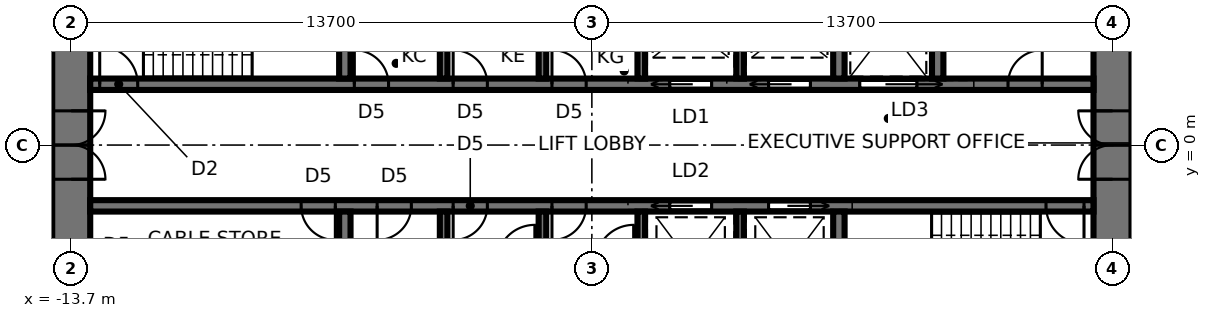
"""IFC4 building model, lengths in metres.
Left out: names, types, materials, properties, quantities, classifications, styles, units other than length and angle.
Written with IfcOpenShell. Run it as: python <this file> out.ifc"""

import sys

from ifc_helpers import new_model, si_unit, direction, frame, frame_2d, origin, place, context, subcontext, project, spatial, rectangle, extrude, element, fill, save


model = new_model("IFC4")
c1 = context("Model", 3, precision=1e-05, world=origin(), true_north=direction((0.0, 1.0)))
c2 = subcontext(c1, "Body", "Model", "MODEL_VIEW")
j1 = project(units=[si_unit("LENGTHUNIT", "METRE"), si_unit("PLANEANGLEUNIT", "RADIAN")], contexts=[c1])
p1 = place(None, origin())
s1 = spatial("IfcSite", under=j1, at=p1, CompositionType="ELEMENT")
p2 = place(p1, origin())
s2 = spatial("IfcBuilding", under=s1, at=p2, CompositionType="ELEMENT")
p3 = place(p2, frame((0.0, 0.0, 251.8)))
s3 = spatial("IfcBuildingStorey", under=s2, at=p3, CompositionType="ELEMENT", Elevation=251.8)
p4 = place(p3, frame((13.7, -9.5, 0.0), z_axis=(0.0, 0.0, 1.0), x_axis=(0.0, 1.0, 0.0)))
e1 = element("IfcWall", 1, at=p4, inside=s3, PredefinedType="SHEAR", context=c2, shape_type="SweptSolid", body=[
    extrude(rectangle(XDim=19.0, YDim=1.0, at=frame_2d((9.5, 0.0))), origin(), (0.0, 0.0, 1.0), 4.2),
])
p5 = place(p4, frame((8.6, 0.0, 0.0)))
e2 = element("IfcOpeningElement", 2, at=p5, cuts=e1, PredefinedType="OPENING", context=c2, shape_type="SweptSolid", body=[
    extrude(rectangle(XDim=1.8, YDim=2.4, at=frame_2d((0.9, 1.2))), frame((0.0, 0.51, 0.0), z_axis=(0.0, -1.0, 0.0), x_axis=(1.0, 0.0, 0.0)), (0.0, 0.0, 1.0), 1.02),
])
p6 = place(p3, frame((-13.7, 9.5, 0.0), z_axis=(0.0, 0.0, 1.0), x_axis=(0.0, -1.0, 0.0)))
e3 = element("IfcWall", 3, at=p6, inside=s3, PredefinedType="SHEAR", context=c2, shape_type="SweptSolid", body=[
    extrude(rectangle(XDim=19.0, YDim=1.0, at=frame_2d((9.5, 0.0))), origin(), (0.0, 0.0, 1.0), 4.2),
])
p7 = place(p6, frame((8.6, 0.0, 0.0)))
e4 = element("IfcOpeningElement", 4, at=p7, cuts=e3, PredefinedType="OPENING", context=c2, shape_type="SweptSolid", body=[
    extrude(rectangle(XDim=1.8, YDim=2.4, at=frame_2d((0.9, 1.2))), frame((0.0, 0.51, 0.0), z_axis=(0.0, -1.0, 0.0), x_axis=(1.0, 0.0, 0.0)), (0.0, 0.0, 1.0), 1.02),
])
p8 = place(p3, frame((-13.2, 1.6, 0.0), z_axis=(0.0, 0.0, 1.0), x_axis=(1.0, 0.0, 0.0)))
e5 = element("IfcWall", 5, at=p8, inside=s3, PredefinedType="SHEAR", context=c2, shape_type="SweptSolid", body=[
    extrude(rectangle(XDim=26.4, YDim=0.3, at=frame_2d((13.2, 0.0))), origin(), (0.0, 0.0, 1.0), 4.2),
])
p9 = place(p8, frame((0.25, 0.0, 0.0)))
e6 = element("IfcOpeningElement", 6, at=p9, cuts=e5, PredefinedType="OPENING", context=c2, shape_type="SweptSolid", body=[
    extrude(rectangle(XDim=1.0, YDim=2.1, at=frame_2d((0.5, 1.05))), frame((0.0, 0.16, 0.0), z_axis=(0.0, -1.0, 0.0), x_axis=(1.0, 0.0, 0.0)), (0.0, 0.0, 1.0), 0.32),
])
p10 = place(p8, frame((20.25, 0.0, 0.0)))
e7 = element("IfcOpeningElement", 7, at=p10, cuts=e5, PredefinedType="OPENING", context=c2, shape_type="SweptSolid", body=[
    extrude(rectangle(XDim=1.5, YDim=2.4, at=frame_2d((0.75, 1.2))), frame((0.0, 0.16, 0.0), z_axis=(0.0, -1.0, 0.0), x_axis=(1.0, 0.0, 0.0)), (0.0, 0.0, 1.0), 0.32),
])
p11 = place(p8, frame((6.95, 0.0, 0.0)))
e8 = element("IfcOpeningElement", 8, at=p11, cuts=e5, PredefinedType="OPENING", context=c2, shape_type="SweptSolid", body=[
    extrude(rectangle(XDim=0.9, YDim=2.1, at=frame_2d((0.45, 1.05))), frame((0.0, 0.16, 0.0), z_axis=(0.0, -1.0, 0.0), x_axis=(1.0, 0.0, 0.0)), (0.0, 0.0, 1.0), 0.32),
])
p12 = place(p8, frame((9.55, 0.0, 0.0)))
e9 = element("IfcOpeningElement", 9, at=p12, cuts=e5, PredefinedType="OPENING", context=c2, shape_type="SweptSolid", body=[
    extrude(rectangle(XDim=0.9, YDim=2.1, at=frame_2d((0.45, 1.05))), frame((0.0, 0.16, 0.0), z_axis=(0.0, -1.0, 0.0), x_axis=(1.0, 0.0, 0.0)), (0.0, 0.0, 1.0), 0.32),
])
p13 = place(p8, frame((12.15, 0.0, 0.0)))
e10 = element("IfcOpeningElement", 10, at=p13, cuts=e5, PredefinedType="OPENING", context=c2, shape_type="SweptSolid", body=[
    extrude(rectangle(XDim=0.9, YDim=2.1, at=frame_2d((0.45, 1.05))), frame((0.0, 0.16, 0.0), z_axis=(0.0, -1.0, 0.0), x_axis=(1.0, 0.0, 0.0)), (0.0, 0.0, 1.0), 0.32),
])
p14 = place(p8, frame((15.25, 0.0, 0.0)))
e11 = element("IfcOpeningElement", 11, at=p14, cuts=e5, PredefinedType="OPENING", context=c2, shape_type="SweptSolid", body=[
    extrude(rectangle(XDim=1.1, YDim=2.3, at=frame_2d((0.55, 1.15))), frame((0.0, 0.16, 0.0), z_axis=(0.0, -1.0, 0.0), x_axis=(1.0, 0.0, 0.0)), (0.0, 0.0, 1.0), 0.32),
])
p15 = place(p8, frame((17.85, 0.0, 0.0)))
e12 = element("IfcOpeningElement", 12, at=p15, cuts=e5, PredefinedType="OPENING", context=c2, shape_type="SweptSolid", body=[
    extrude(rectangle(XDim=1.1, YDim=2.3, at=frame_2d((0.55, 1.15))), frame((0.0, 0.16, 0.0), z_axis=(0.0, -1.0, 0.0), x_axis=(1.0, 0.0, 0.0)), (0.0, 0.0, 1.0), 0.32),
])
p16 = place(p8, frame((24.15, 0.0, 0.0)))
e13 = element("IfcOpeningElement", 13, at=p16, cuts=e5, PredefinedType="OPENING", context=c2, shape_type="SweptSolid", body=[
    extrude(rectangle(XDim=0.9, YDim=2.1, at=frame_2d((0.45, 1.05))), frame((0.0, 0.16, 0.0), z_axis=(0.0, -1.0, 0.0), x_axis=(1.0, 0.0, 0.0)), (0.0, 0.0, 1.0), 0.32),
])
p17 = place(p3, frame((-13.2, -1.6, 0.0), z_axis=(0.0, 0.0, 1.0), x_axis=(1.0, 0.0, 0.0)))
e14 = element("IfcWall", 14, at=p17, inside=s3, PredefinedType="SHEAR", context=c2, shape_type="SweptSolid", body=[
    extrude(rectangle(XDim=26.4, YDim=0.3, at=frame_2d((13.2, 0.0))), origin(), (0.0, 0.0, 1.0), 4.2),
])
p18 = place(p17, frame((25.15, 0.0, 0.0)))
e15 = element("IfcOpeningElement", 15, at=p18, cuts=e14, PredefinedType="OPENING", context=c2, shape_type="SweptSolid", body=[
    extrude(rectangle(XDim=1.0, YDim=2.1, at=frame_2d((0.5, 1.05))), frame((0.0, 0.16, 0.0), z_axis=(0.0, -1.0, 0.0), x_axis=(1.0, 0.0, 0.0)), (0.0, 0.0, 1.0), 0.32),
])
p19 = place(p17, frame((7.55, 0.0, 0.0)))
e16 = element("IfcOpeningElement", 16, at=p19, cuts=e14, PredefinedType="OPENING", context=c2, shape_type="SweptSolid", body=[
    extrude(rectangle(XDim=0.9, YDim=2.1, at=frame_2d((0.45, 1.05))), frame((0.0, 0.16, 0.0), z_axis=(0.0, -1.0, 0.0), x_axis=(1.0, 0.0, 0.0)), (0.0, 0.0, 1.0), 0.32),
])
p20 = place(p17, frame((9.55, 0.0, 0.0)))
e17 = element("IfcOpeningElement", 17, at=p20, cuts=e14, PredefinedType="OPENING", context=c2, shape_type="SweptSolid", body=[
    extrude(rectangle(XDim=0.9, YDim=2.1, at=frame_2d((0.45, 1.05))), frame((0.0, 0.16, 0.0), z_axis=(0.0, -1.0, 0.0), x_axis=(1.0, 0.0, 0.0)), (0.0, 0.0, 1.0), 0.32),
])
p21 = place(p17, frame((12.15, 0.0, 0.0)))
e18 = element("IfcOpeningElement", 18, at=p21, cuts=e14, PredefinedType="OPENING", context=c2, shape_type="SweptSolid", body=[
    extrude(rectangle(XDim=0.9, YDim=2.1, at=frame_2d((0.45, 1.05))), frame((0.0, 0.16, 0.0), z_axis=(0.0, -1.0, 0.0), x_axis=(1.0, 0.0, 0.0)), (0.0, 0.0, 1.0), 0.32),
])
p22 = place(p17, frame((15.25, 0.0, 0.0)))
e19 = element("IfcOpeningElement", 19, at=p22, cuts=e14, PredefinedType="OPENING", context=c2, shape_type="SweptSolid", body=[
    extrude(rectangle(XDim=1.1, YDim=2.3, at=frame_2d((0.55, 1.15))), frame((0.0, 0.16, 0.0), z_axis=(0.0, -1.0, 0.0), x_axis=(1.0, 0.0, 0.0)), (0.0, 0.0, 1.0), 0.32),
])
p23 = place(p17, frame((17.85, 0.0, 0.0)))
e20 = element("IfcOpeningElement", 20, at=p23, cuts=e14, PredefinedType="OPENING", context=c2, shape_type="SweptSolid", body=[
    extrude(rectangle(XDim=1.1, YDim=2.3, at=frame_2d((0.55, 1.15))), frame((0.0, 0.16, 0.0), z_axis=(0.0, -1.0, 0.0), x_axis=(1.0, 0.0, 0.0)), (0.0, 0.0, 1.0), 0.32),
])
p24 = place(p17, frame((5.55, 0.0, 0.0)))
e21 = element("IfcOpeningElement", 21, at=p24, cuts=e14, PredefinedType="OPENING", context=c2, shape_type="SweptSolid", body=[
    extrude(rectangle(XDim=0.9, YDim=2.1, at=frame_2d((0.45, 1.05))), frame((0.0, 0.16, 0.0), z_axis=(0.0, -1.0, 0.0), x_axis=(1.0, 0.0, 0.0)), (0.0, 0.0, 1.0), 0.32),
])
for number, where, z_axis, x_axis in (
    (22, (-6.5, 1.75, 0.0), (0.0, 0.0, 1.0), (0.0, 1.0, 0.0)),
    (23, (6.5, 1.75, 0.0), (0.0, 0.0, 1.0), (0.0, 1.0, 0.0)),
):
    element("IfcWall", number, at=place(p3, frame(where, z_axis=z_axis, x_axis=x_axis)), inside=s3, PredefinedType="SHEAR", context=c2, shape_type="SweptSolid", body=[
        extrude(rectangle(XDim=2.7, YDim=0.3, at=frame_2d((1.35, 0.0))), origin(), (0.0, 0.0, 1.0), 4.2),
    ])
for number, where, z_axis, x_axis in (
    (24, (-3.9, 1.75, 0.0), (0.0, 0.0, 1.0), (0.0, 1.0, 0.0)),
    (25, (-1.3, 1.75, 0.0), (0.0, 0.0, 1.0), (0.0, 1.0, 0.0)),
    (26, (1.3, 1.75, 0.0), (0.0, 0.0, 1.0), (0.0, 1.0, 0.0)),
    (27, (3.9, 1.75, 0.0), (0.0, 0.0, 1.0), (0.0, 1.0, 0.0)),
):
    element("IfcWall", number, at=place(p3, frame(where, z_axis=z_axis, x_axis=x_axis)), inside=s3, PredefinedType="SHEAR", context=c2, shape_type="SweptSolid", body=[
        extrude(rectangle(XDim=2.7, YDim=0.2, at=frame_2d((1.35, 0.0))), origin(), (0.0, 0.0, 1.0), 4.2),
    ])
for number, where, z_axis, x_axis in (
    (28, (-6.5, -1.75, 0.0), (0.0, 0.0, 1.0), (0.0, -1.0, 0.0)),
    (29, (6.5, -1.75, 0.0), (0.0, 0.0, 1.0), (0.0, -1.0, 0.0)),
):
    element("IfcWall", number, at=place(p3, frame(where, z_axis=z_axis, x_axis=x_axis)), inside=s3, PredefinedType="SHEAR", context=c2, shape_type="SweptSolid", body=[
        extrude(rectangle(XDim=2.7, YDim=0.3, at=frame_2d((1.35, 0.0))), origin(), (0.0, 0.0, 1.0), 4.2),
    ])
for number, where, z_axis, x_axis in (
    (30, (-3.9, -1.75, 0.0), (0.0, 0.0, 1.0), (0.0, -1.0, 0.0)),
    (31, (-1.3, -1.75, 0.0), (0.0, 0.0, 1.0), (0.0, -1.0, 0.0)),
    (32, (1.3, -1.75, 0.0), (0.0, 0.0, 1.0), (0.0, -1.0, 0.0)),
    (33, (3.9, -1.75, 0.0), (0.0, 0.0, 1.0), (0.0, -1.0, 0.0)),
):
    element("IfcWall", number, at=place(p3, frame(where, z_axis=z_axis, x_axis=x_axis)), inside=s3, PredefinedType="SHEAR", context=c2, shape_type="SweptSolid", body=[
        extrude(rectangle(XDim=2.7, YDim=0.2, at=frame_2d((1.35, 0.0))), origin(), (0.0, 0.0, 1.0), 4.2),
    ])
p25 = place(p3, frame((9.1, 1.75, 0.0), z_axis=(0.0, 0.0, 1.0), x_axis=(0.0, 1.0, 0.0)))
e34 = element("IfcWall", 34, at=p25, inside=s3, PredefinedType="SHEAR", context=c2, shape_type="SweptSolid", body=[
    extrude(rectangle(XDim=2.7, YDim=0.3, at=frame_2d((1.35, 0.0))), origin(), (0.0, 0.0, 1.0), 4.2),
])
p26 = place(p7, origin())
e35 = element("IfcDoor", 35, at=p26, inside=s3, OperationType="DOUBLE_DOOR_SINGLE_SWING", PredefinedType="DOOR", context=c2, shape_type="SweptSolid", body=[
    extrude(rectangle(XDim=1.72, YDim=2.36, at=frame_2d((0.9, 1.18))), frame((0.0, 0.025, 0.0), z_axis=(0.0, -1.0, 0.0), x_axis=(1.0, 0.0, 0.0)), (0.0, 0.0, 1.0), 0.05),
    extrude(rectangle(XDim=0.04, YDim=2.4, at=frame_2d((0.02, 1.2))), frame((0.0, 0.25, 0.0), z_axis=(0.0, -1.0, 0.0), x_axis=(1.0, 0.0, 0.0)), (0.0, 0.0, 1.0), 0.5),
    extrude(rectangle(XDim=0.04, YDim=2.4, at=frame_2d((1.78, 1.2))), frame((0.0, 0.25, 0.0), z_axis=(0.0, -1.0, 0.0), x_axis=(1.0, 0.0, 0.0)), (0.0, 0.0, 1.0), 0.5),
    extrude(rectangle(XDim=1.72, YDim=0.04, at=frame_2d((0.9, 2.38))), frame((0.0, 0.25, 0.0), z_axis=(0.0, -1.0, 0.0), x_axis=(1.0, 0.0, 0.0)), (0.0, 0.0, 1.0), 0.5),
])
fill(e4, e35)
p27 = place(p5, origin())
e36 = element("IfcDoor", 36, at=p27, inside=s3, OperationType="DOUBLE_DOOR_SINGLE_SWING", PredefinedType="DOOR", context=c2, shape_type="SweptSolid", body=[
    extrude(rectangle(XDim=1.72, YDim=2.36, at=frame_2d((0.9, 1.18))), frame((0.0, 0.025, 0.0), z_axis=(0.0, -1.0, 0.0), x_axis=(1.0, 0.0, 0.0)), (0.0, 0.0, 1.0), 0.05),
    extrude(rectangle(XDim=0.04, YDim=2.4, at=frame_2d((0.02, 1.2))), frame((0.0, 0.25, 0.0), z_axis=(0.0, -1.0, 0.0), x_axis=(1.0, 0.0, 0.0)), (0.0, 0.0, 1.0), 0.5),
    extrude(rectangle(XDim=0.04, YDim=2.4, at=frame_2d((1.78, 1.2))), frame((0.0, 0.25, 0.0), z_axis=(0.0, -1.0, 0.0), x_axis=(1.0, 0.0, 0.0)), (0.0, 0.0, 1.0), 0.5),
    extrude(rectangle(XDim=1.72, YDim=0.04, at=frame_2d((0.9, 2.38))), frame((0.0, 0.25, 0.0), z_axis=(0.0, -1.0, 0.0), x_axis=(1.0, 0.0, 0.0)), (0.0, 0.0, 1.0), 0.5),
])
fill(e2, e36)
p28 = place(p9, origin())
e37 = element("IfcDoor", 37, at=p28, inside=s3, OperationType="SINGLE_SWING_LEFT", PredefinedType="DOOR", context=c2, shape_type="SweptSolid", body=[
    extrude(rectangle(XDim=1.0, YDim=2.1, at=frame_2d((0.5, 1.05))), frame((0.0, 0.025, 0.0), z_axis=(0.0, -1.0, 0.0), x_axis=(1.0, 0.0, 0.0)), (0.0, 0.0, 1.0), 0.05),
])
fill(e6, e37)
p29 = place(p18, frame((1.0, 0.0, 0.0), z_axis=(0.0, 0.0, 1.0), x_axis=(-1.0, 0.0, 0.0)))
e38 = element("IfcDoor", 38, at=p29, inside=s3, OperationType="SINGLE_SWING_LEFT", PredefinedType="DOOR", context=c2, shape_type="SweptSolid", body=[
    extrude(rectangle(XDim=1.0, YDim=2.1, at=frame_2d((0.5, 1.05))), frame((0.0, 0.025, 0.0), z_axis=(0.0, -1.0, 0.0), x_axis=(1.0, 0.0, 0.0)), (0.0, 0.0, 1.0), 0.05),
])
fill(e15, e38)
p30 = place(p10, origin())
e39 = element("IfcDoor", 39, at=p30, inside=s3, OperationType="SLIDING_TO_RIGHT", PredefinedType="DOOR", context=c2, shape_type="SweptSolid", body=[
    extrude(rectangle(XDim=1.5, YDim=2.4, at=frame_2d((0.75, 1.2))), frame((0.0, 0.025, 0.0), z_axis=(0.0, -1.0, 0.0), x_axis=(1.0, 0.0, 0.0)), (0.0, 0.0, 1.0), 0.05),
])
fill(e7, e39)
p31 = place(p11, origin())
e40 = element("IfcDoor", 40, at=p31, inside=s3, OperationType="SINGLE_SWING_LEFT", PredefinedType="DOOR", context=c2, shape_type="SweptSolid", body=[
    extrude(rectangle(XDim=0.9, YDim=2.1, at=frame_2d((0.45, 1.05))), frame((0.0, 0.025, 0.0), z_axis=(0.0, -1.0, 0.0), x_axis=(1.0, 0.0, 0.0)), (0.0, 0.0, 1.0), 0.05),
])
fill(e8, e40)
p32 = place(p12, origin())
e41 = element("IfcDoor", 41, at=p32, inside=s3, OperationType="SINGLE_SWING_LEFT", PredefinedType="DOOR", context=c2, shape_type="SweptSolid", body=[
    extrude(rectangle(XDim=0.9, YDim=2.1, at=frame_2d((0.45, 1.05))), frame((0.0, 0.025, 0.0), z_axis=(0.0, -1.0, 0.0), x_axis=(1.0, 0.0, 0.0)), (0.0, 0.0, 1.0), 0.05),
])
fill(e9, e41)
p33 = place(p13, origin())
e42 = element("IfcDoor", 42, at=p33, inside=s3, OperationType="SINGLE_SWING_LEFT", PredefinedType="DOOR", context=c2, shape_type="SweptSolid", body=[
    extrude(rectangle(XDim=0.9, YDim=2.1, at=frame_2d((0.45, 1.05))), frame((0.0, 0.025, 0.0), z_axis=(0.0, -1.0, 0.0), x_axis=(1.0, 0.0, 0.0)), (0.0, 0.0, 1.0), 0.05),
])
fill(e10, e42)
p34 = place(p14, origin())
e43 = element("IfcDoor", 43, at=p34, inside=s3, OperationType="SLIDING_TO_LEFT", PredefinedType="DOOR", context=c2, shape_type="SweptSolid", body=[
    extrude(rectangle(XDim=1.1, YDim=2.3, at=frame_2d((0.55, 1.15))), frame((0.0, 0.025, 0.0), z_axis=(0.0, -1.0, 0.0), x_axis=(1.0, 0.0, 0.0)), (0.0, 0.0, 1.0), 0.05),
])
fill(e11, e43)
p35 = place(p15, origin())
e44 = element("IfcDoor", 44, at=p35, inside=s3, OperationType="SLIDING_TO_LEFT", PredefinedType="DOOR", context=c2, shape_type="SweptSolid", body=[
    extrude(rectangle(XDim=1.1, YDim=2.3, at=frame_2d((0.55, 1.15))), frame((0.0, 0.025, 0.0), z_axis=(0.0, -1.0, 0.0), x_axis=(1.0, 0.0, 0.0)), (0.0, 0.0, 1.0), 0.05),
])
fill(e12, e44)
p36 = place(p19, frame((0.9, 0.0, 0.0), z_axis=(0.0, 0.0, 1.0), x_axis=(-1.0, 0.0, 0.0)))
e45 = element("IfcDoor", 45, at=p36, inside=s3, OperationType="SINGLE_SWING_RIGHT", PredefinedType="DOOR", context=c2, shape_type="SweptSolid", body=[
    extrude(rectangle(XDim=0.9, YDim=2.1, at=frame_2d((0.45, 1.05))), frame((0.0, 0.025, 0.0), z_axis=(0.0, -1.0, 0.0), x_axis=(1.0, 0.0, 0.0)), (0.0, 0.0, 1.0), 0.05),
])
fill(e16, e45)
p37 = place(p20, frame((0.9, 0.0, 0.0), z_axis=(0.0, 0.0, 1.0), x_axis=(-1.0, 0.0, 0.0)))
e46 = element("IfcDoor", 46, at=p37, inside=s3, OperationType="SINGLE_SWING_RIGHT", PredefinedType="DOOR", context=c2, shape_type="SweptSolid", body=[
    extrude(rectangle(XDim=0.9, YDim=2.1, at=frame_2d((0.45, 1.05))), frame((0.0, 0.025, 0.0), z_axis=(0.0, -1.0, 0.0), x_axis=(1.0, 0.0, 0.0)), (0.0, 0.0, 1.0), 0.05),
])
fill(e17, e46)
p38 = place(p21, frame((0.9, 0.0, 0.0), z_axis=(0.0, 0.0, 1.0), x_axis=(-1.0, 0.0, 0.0)))
e47 = element("IfcDoor", 47, at=p38, inside=s3, OperationType="SINGLE_SWING_RIGHT", PredefinedType="DOOR", context=c2, shape_type="SweptSolid", body=[
    extrude(rectangle(XDim=0.9, YDim=2.1, at=frame_2d((0.45, 1.05))), frame((0.0, 0.025, 0.0), z_axis=(0.0, -1.0, 0.0), x_axis=(1.0, 0.0, 0.0)), (0.0, 0.0, 1.0), 0.05),
])
fill(e18, e47)
p39 = place(p22, frame((1.1, 0.0, 0.0), z_axis=(0.0, 0.0, 1.0), x_axis=(-1.0, 0.0, 0.0)))
e48 = element("IfcDoor", 48, at=p39, inside=s3, OperationType="SLIDING_TO_RIGHT", PredefinedType="DOOR", context=c2, shape_type="SweptSolid", body=[
    extrude(rectangle(XDim=1.1, YDim=2.3, at=frame_2d((0.55, 1.15))), frame((0.0, 0.025, 0.0), z_axis=(0.0, -1.0, 0.0), x_axis=(1.0, 0.0, 0.0)), (0.0, 0.0, 1.0), 0.05),
])
fill(e19, e48)
p40 = place(p23, frame((1.1, 0.0, 0.0), z_axis=(0.0, 0.0, 1.0), x_axis=(-1.0, 0.0, 0.0)))
e49 = element("IfcDoor", 49, at=p40, inside=s3, OperationType="SLIDING_TO_LEFT", PredefinedType="DOOR", context=c2, shape_type="SweptSolid", body=[
    extrude(rectangle(XDim=1.1, YDim=2.3, at=frame_2d((0.55, 1.15))), frame((0.0, 0.025, 0.0), z_axis=(0.0, -1.0, 0.0), x_axis=(1.0, 0.0, 0.0)), (0.0, 0.0, 1.0), 0.05),
])
fill(e20, e49)
p41 = place(p16, origin())
e50 = element("IfcDoor", 50, at=p41, inside=s3, OperationType="SINGLE_SWING_RIGHT", PredefinedType="DOOR", context=c2, shape_type="SweptSolid", body=[
    extrude(rectangle(XDim=0.9, YDim=2.1, at=frame_2d((0.45, 1.05))), frame((0.0, 0.025, 0.0), z_axis=(0.0, -1.0, 0.0), x_axis=(1.0, 0.0, 0.0)), (0.0, 0.0, 1.0), 0.05),
])
fill(e13, e50)
p42 = place(p24, frame((0.9, 0.0, 0.0), z_axis=(0.0, 0.0, 1.0), x_axis=(-1.0, 0.0, 0.0)))
e51 = element("IfcDoor", 51, at=p42, inside=s3, OperationType="SINGLE_SWING_LEFT", PredefinedType="DOOR", context=c2, shape_type="SweptSolid", body=[
    extrude(rectangle(XDim=0.9, YDim=2.1, at=frame_2d((0.45, 1.05))), frame((0.0, 0.025, 0.0), z_axis=(0.0, -1.0, 0.0), x_axis=(1.0, 0.0, 0.0)), (0.0, 0.0, 1.0), 0.05),
])
fill(e21, e51)
save(model, sys.argv[1])
